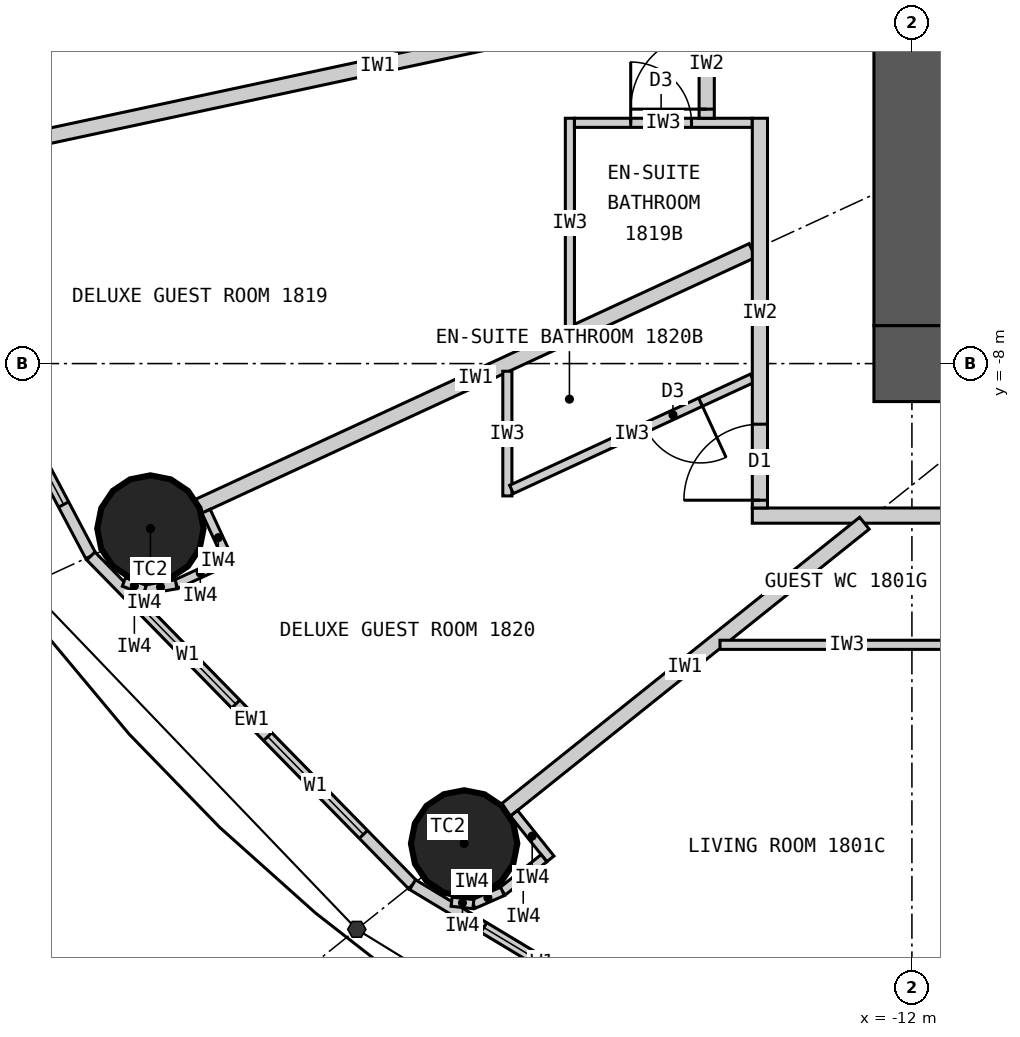
"""IFC4 building model, lengths in metres.
Left out: names, types, materials, properties, quantities, classifications, styles, units other than length and angle.
Written with IfcOpenShell. Run it as: python <this file> out.ifc"""

import sys

from ifc_helpers import new_model, si_unit, direction, frame, frame_2d, origin, origin_2d, place, context, subcontext, project, spatial, rectangle, circle, extrude, element, fill, save


model = new_model("IFC4")
c1 = context("Model", 3, precision=1e-05, world=origin(), true_north=direction((0.0, 1.0)))
c2 = subcontext(c1, "Body", "Model", "MODEL_VIEW")
j1 = project(units=[si_unit("LENGTHUNIT", "METRE"), si_unit("PLANEANGLEUNIT", "RADIAN")], contexts=[c1])
p1 = place(None, origin())
s1 = spatial("IfcSite", under=j1, at=p1, CompositionType="ELEMENT")
p2 = place(p1, origin())
s2 = spatial("IfcBuilding", under=s1, at=p2, CompositionType="ELEMENT")
p3 = place(p2, frame((0.0, 0.0, 73.8)))
s3 = spatial("IfcBuildingStorey", under=s2, at=p3, CompositionType="ELEMENT", Elevation=73.8)
for number, where, z_axis, x_axis in (
    (1, (-22.019, -10.17, 0.0), (0.0, 0.0, 1.0), (1.0, 0.0, 0.0)),
    (2, (-17.892, -14.313, 0.0), (0.0, 0.0, 1.0), (1.0, 0.0, 0.0)),
):
    element("IfcColumn", number, at=place(p3, frame(where, z_axis=z_axis, x_axis=x_axis)), inside=s3, PredefinedType="COLUMN", context=c2, shape_type="SweptSolid", body=[
        extrude(circle(Radius=0.7, at=origin_2d()), origin(), (0.0, 0.0, 1.0), 3.3),
    ])
p4 = place(p3, frame((12.5, -8.0, 0.0), z_axis=(0.0, 0.0, 1.0), x_axis=(-1.0, 0.0, 0.0)))
e3 = element("IfcWall", 3, at=p4, inside=s3, PredefinedType="SHEAR", context=c2, shape_type="SweptSolid", body=[
    extrude(rectangle(XDim=25.0, YDim=1.0, at=frame_2d((12.5, 0.0))), origin(), (0.0, 0.0, 1.0), 3.3),
])
p5 = place(p4, frame((11.2, 0.0, 0.0)))
e4 = element("IfcOpeningElement", 4, at=p5, cuts=e3, PredefinedType="OPENING", context=c2, shape_type="SweptSolid", body=[
    extrude(rectangle(XDim=1.2, YDim=2.2, at=frame_2d((0.6, 1.1))), frame((0.0, 0.51, 0.0), z_axis=(0.0, -1.0, 0.0), x_axis=(1.0, 0.0, 0.0)), (0.0, 0.0, 1.0), 1.02),
])
p6 = place(p4, frame((18.8, 0.0, 0.0)))
e5 = element("IfcOpeningElement", 5, at=p6, cuts=e3, PredefinedType="OPENING", context=c2, shape_type="SweptSolid", body=[
    extrude(rectangle(XDim=0.9, YDim=2.2, at=frame_2d((0.45, 1.1))), frame((0.0, 0.51, 0.0), z_axis=(0.0, -1.0, 0.0), x_axis=(1.0, 0.0, 0.0)), (0.0, 0.0, 1.0), 1.02),
])
p7 = place(p3, frame((-12.0, 7.5, 0.0), z_axis=(0.0, 0.0, 1.0), x_axis=(0.0, -1.0, 0.0)))
e6 = element("IfcWall", 6, at=p7, inside=s3, PredefinedType="SHEAR", context=c2, shape_type="SweptSolid", body=[
    extrude(rectangle(XDim=15.0, YDim=1.0, at=frame_2d((7.5, 0.0))), origin(), (0.0, 0.0, 1.0), 3.3),
])
p8 = place(p7, frame((6.6, 0.0, 0.0)))
e7 = element("IfcOpeningElement", 7, at=p8, cuts=e6, PredefinedType="OPENING", context=c2, shape_type="SweptSolid", body=[
    extrude(rectangle(XDim=1.8, YDim=2.2, at=frame_2d((0.9, 1.1))), frame((0.0, 0.51, 0.0), z_axis=(0.0, -1.0, 0.0), x_axis=(1.0, 0.0, 0.0)), (0.0, 0.0, 1.0), 1.02),
])
p9 = place(p3, frame((-25.482, -5.462, 0.0), z_axis=(0.0, 0.0, 1.0), x_axis=(0.467296867008, -0.884100468321, 0.0)))
e8 = element("IfcWall", 8, at=p9, inside=s3, PredefinedType="ELEMENTEDWALL", context=c2, shape_type="SweptSolid", body=[
    extrude(rectangle(XDim=5.734, YDim=0.15, at=frame_2d((2.867, 0.0))), origin(), (0.0, 0.0, 1.0), 3.12),
])
p10 = place(p9, frame((0.767, 0.0, 0.9)))
e9 = element("IfcOpeningElement", 9, at=p10, cuts=e8, PredefinedType="OPENING", context=c2, shape_type="SweptSolid", body=[
    extrude(rectangle(XDim=1.8, YDim=1.9, at=frame_2d((0.9, 0.95))), frame((0.0, 0.085, 0.0), z_axis=(0.0, -1.0, 0.0), x_axis=(1.0, 0.0, 0.0)), (0.0, 0.0, 1.0), 0.17),
])
p11 = place(p9, frame((3.167, 0.0, 0.9)))
e10 = element("IfcOpeningElement", 10, at=p11, cuts=e8, PredefinedType="OPENING", context=c2, shape_type="SweptSolid", body=[
    extrude(rectangle(XDim=1.8, YDim=1.9, at=frame_2d((0.9, 0.95))), frame((0.0, 0.085, 0.0), z_axis=(0.0, -1.0, 0.0), x_axis=(1.0, 0.0, 0.0)), (0.0, 0.0, 1.0), 0.17),
])
p12 = place(p3, frame((-22.803, -10.532, 0.0), z_axis=(0.0, 0.0, 1.0), x_axis=(0.699602905915, -0.714531856557, 0.0)))
e11 = element("IfcWall", 11, at=p12, inside=s3, PredefinedType="ELEMENTEDWALL", context=c2, shape_type="SweptSolid", body=[
    extrude(rectangle(XDim=6.051, YDim=0.15, at=frame_2d((3.025, 0.0))), origin(), (0.0, 0.0, 1.0), 3.12),
])
p13 = place(p12, frame((0.926, 0.0, 0.9)))
e12 = element("IfcOpeningElement", 12, at=p13, cuts=e11, PredefinedType="OPENING", context=c2, shape_type="SweptSolid", body=[
    extrude(rectangle(XDim=1.8, YDim=1.9, at=frame_2d((0.9, 0.95))), frame((0.0, 0.085, 0.0), z_axis=(0.0, -1.0, 0.0), x_axis=(1.0, 0.0, 0.0)), (0.0, 0.0, 1.0), 0.17),
])
p14 = place(p12, frame((3.325, 0.0, 0.9)))
e13 = element("IfcOpeningElement", 13, at=p14, cuts=e11, PredefinedType="OPENING", context=c2, shape_type="SweptSolid", body=[
    extrude(rectangle(XDim=1.8, YDim=1.9, at=frame_2d((0.9, 0.95))), frame((0.0, 0.085, 0.0), z_axis=(0.0, -1.0, 0.0), x_axis=(1.0, 0.0, 0.0)), (0.0, 0.0, 1.0), 0.17),
])
p15 = place(p3, frame((-18.57, -14.856, 0.0), z_axis=(0.0, 0.0, 1.0), x_axis=(0.856983180864, -0.515344377787, 0.0)))
e14 = element("IfcWall", 14, at=p15, inside=s3, PredefinedType="ELEMENTEDWALL", context=c2, shape_type="SweptSolid", body=[
    extrude(rectangle(XDim=6.386, YDim=0.15, at=frame_2d((3.193, 0.0))), origin(), (0.0, 0.0, 1.0), 3.12),
])
p16 = place(p15, frame((1.093, 0.0, 0.9)))
e15 = element("IfcOpeningElement", 15, at=p16, cuts=e14, PredefinedType="OPENING", context=c2, shape_type="SweptSolid", body=[
    extrude(rectangle(XDim=1.8, YDim=1.9, at=frame_2d((0.9, 0.95))), frame((0.0, 0.085, 0.0), z_axis=(0.0, -1.0, 0.0), x_axis=(1.0, 0.0, 0.0)), (0.0, 0.0, 1.0), 0.17),
])
p17 = place(p15, frame((3.493, 0.0, 0.9)))
e16 = element("IfcOpeningElement", 16, at=p17, cuts=e14, PredefinedType="OPENING", context=c2, shape_type="SweptSolid", body=[
    extrude(rectangle(XDim=1.8, YDim=1.9, at=frame_2d((0.9, 0.95))), frame((0.0, 0.085, 0.0), z_axis=(0.0, -1.0, 0.0), x_axis=(1.0, 0.0, 0.0)), (0.0, 0.0, 1.0), 0.17),
])
p18 = place(p3, frame((14.1, -10.0, 0.0), z_axis=(0.0, 0.0, 1.0), x_axis=(-1.0, 0.0, 0.0)))
e17 = element("IfcWall", 17, at=p18, inside=s3, PredefinedType="PARTITIONING", context=c2, shape_type="SweptSolid", body=[
    extrude(rectangle(XDim=28.2, YDim=0.2, at=frame_2d((14.1, 0.0))), origin(), (0.0, 0.0, 1.0), 3.12),
])
p19 = place(p18, frame((24.165, 0.0, 0.0)))
e18 = element("IfcOpeningElement", 18, at=p19, cuts=e17, PredefinedType="OPENING", context=c2, shape_type="SweptSolid", body=[
    extrude(rectangle(XDim=1.0, YDim=2.2, at=frame_2d((0.5, 1.1))), frame((0.0, 0.11, 0.0), z_axis=(0.0, -1.0, 0.0), x_axis=(1.0, 0.0, 0.0)), (0.0, 0.0, 1.0), 0.22),
])
p20 = place(p18, frame((14.923, 0.0, 0.0)))
e19 = element("IfcOpeningElement", 19, at=p20, cuts=e17, PredefinedType="OPENING", context=c2, shape_type="SweptSolid", body=[
    extrude(rectangle(XDim=1.0, YDim=2.2, at=frame_2d((0.5, 1.1))), frame((0.0, 0.11, 0.0), z_axis=(0.0, -1.0, 0.0), x_axis=(1.0, 0.0, 0.0)), (0.0, 0.0, 1.0), 0.22),
])
p21 = place(p18, frame((3.035, 0.0, 0.0)))
e20 = element("IfcOpeningElement", 20, at=p21, cuts=e17, PredefinedType="OPENING", context=c2, shape_type="SweptSolid", body=[
    extrude(rectangle(XDim=1.0, YDim=2.2, at=frame_2d((0.5, 1.1))), frame((0.0, 0.11, 0.0), z_axis=(0.0, -1.0, 0.0), x_axis=(1.0, 0.0, 0.0)), (0.0, 0.0, 1.0), 0.22),
])
p22 = place(p3, frame((-14.1, -3.022, 0.0), z_axis=(0.0, 0.0, 1.0), x_axis=(-0.977790014929, -0.209586943072, 0.0)))
e21 = element("IfcWall", 21, at=p22, inside=s3, PredefinedType="PARTITIONING", context=c2, shape_type="SweptSolid", body=[
    extrude(rectangle(XDim=10.087, YDim=0.2, at=frame_2d((5.043, 0.0))), origin(), (0.0, 0.0, 1.0), 2.32),
])
p23 = place(p3, frame((-14.1, -6.512, 0.0), z_axis=(0.0, 0.0, 1.0), x_axis=(-0.907832871056, -0.419332181247, 0.0)))
e22 = element("IfcWall", 22, at=p23, inside=s3, PredefinedType="PARTITIONING", context=c2, shape_type="SweptSolid", body=[
    extrude(rectangle(XDim=8.023, YDim=0.2, at=frame_2d((4.011, 0.0))), origin(), (0.0, 0.0, 1.0), 2.32),
])
p24 = place(p3, frame((-12.625, -10.1, 0.0), z_axis=(0.0, 0.0, 1.0), x_axis=(-0.780892451574, -0.624665493744, 0.0)))
e23 = element("IfcWall", 23, at=p24, inside=s3, PredefinedType="PARTITIONING", context=c2, shape_type="SweptSolid", body=[
    extrude(rectangle(XDim=6.045, YDim=0.2, at=frame_2d((3.022, 0.0))), origin(), (0.0, 0.0, 1.0), 2.32),
])
p25 = place(p3, frame((-7.289, -10.1, 0.0), z_axis=(0.0, 0.0, 1.0), x_axis=(-0.585198353053, -0.810890182197, 0.0)))
e24 = element("IfcWall", 24, at=p25, inside=s3, PredefinedType="PARTITIONING", context=c2, shape_type="SweptSolid", body=[
    extrude(rectangle(XDim=8.36, YDim=0.2, at=frame_2d((4.18, 0.0))), origin(), (0.0, 0.0, 1.0), 2.32),
])
p26 = place(p25, frame((0.72, 0.0, 0.0)))
e25 = element("IfcOpeningElement", 25, at=p26, cuts=e24, PredefinedType="OPENING", context=c2, shape_type="SweptSolid", body=[
    extrude(rectangle(XDim=0.9, YDim=2.1, at=frame_2d((0.45, 1.05))), frame((0.0, 0.11, 0.0), z_axis=(0.0, -1.0, 0.0), x_axis=(1.0, 0.0, 0.0)), (0.0, 0.0, 1.0), 0.22),
])
p27 = place(p3, frame((-14.525, -11.7, 0.0), z_axis=(0.0, 0.0, 1.0), x_axis=(1.0, 0.0, 0.0)))
e26 = element("IfcWall", 26, at=p27, inside=s3, PredefinedType="PARTITIONING", context=c2, shape_type="SweptSolid", body=[
    extrude(rectangle(XDim=3.34, YDim=0.12, at=frame_2d((1.67, 0.0))), origin(), (0.0, 0.0, 1.0), 3.12),
])
p28 = place(p3, frame((-16.5, -7.521, 0.0), z_axis=(0.0, 0.0, 1.0), x_axis=(0.0, 1.0, 0.0)))
e27 = element("IfcWall", 27, at=p28, inside=s3, PredefinedType="PARTITIONING", context=c2, shape_type="SweptSolid", body=[
    extrude(rectangle(XDim=2.749, YDim=0.12, at=frame_2d((1.374, 0.0))), origin(), (0.0, 0.0, 1.0), 3.12),
])
p29 = place(p3, frame((-14.1, -4.833, 0.0), z_axis=(0.0, 0.0, 1.0), x_axis=(-1.0, 0.0, 0.0)))
e28 = element("IfcWall", 28, at=p29, inside=s3, PredefinedType="PARTITIONING", context=c2, shape_type="SweptSolid", body=[
    extrude(rectangle(XDim=2.34, YDim=0.12, at=frame_2d((1.17, 0.0))), origin(), (0.0, 0.0, 1.0), 3.12),
])
p30 = place(p29, frame((0.8, 0.0, 0.0)))
e29 = element("IfcOpeningElement", 29, at=p30, cuts=e28, PredefinedType="OPENING", context=c2, shape_type="SweptSolid", body=[
    extrude(rectangle(XDim=0.8, YDim=2.1, at=frame_2d((0.4, 1.05))), frame((0.0, 0.07, 0.0), z_axis=(0.0, -1.0, 0.0), x_axis=(1.0, 0.0, 0.0)), (0.0, 0.0, 1.0), 0.14),
])
p31 = place(p3, frame((-17.323, -8.101, 0.0), z_axis=(0.0, 0.0, 1.0), x_axis=(0.0, -1.0, 0.0)))
e30 = element("IfcWall", 30, at=p31, inside=s3, PredefinedType="PARTITIONING", context=c2, shape_type="SweptSolid", body=[
    extrude(rectangle(XDim=1.64, YDim=0.12, at=frame_2d((0.82, 0.0))), origin(), (0.0, 0.0, 1.0), 3.12),
])
p32 = place(p3, frame((-14.1, -8.193, 0.0), z_axis=(0.0, 0.0, 1.0), x_axis=(-0.907836493557, -0.419324338628, 0.0)))
e31 = element("IfcWall", 31, at=p32, inside=s3, PredefinedType="PARTITIONING", context=c2, shape_type="SweptSolid", body=[
    extrude(rectangle(XDim=3.49, YDim=0.12, at=frame_2d((1.745, 0.0))), origin(), (0.0, 0.0, 1.0), 3.12),
])
p33 = place(p32, frame((0.75, 0.0, 0.0)))
e32 = element("IfcOpeningElement", 32, at=p33, cuts=e31, PredefinedType="OPENING", context=c2, shape_type="SweptSolid", body=[
    extrude(rectangle(XDim=0.8, YDim=2.1, at=frame_2d((0.4, 1.05))), frame((0.0, 0.07, 0.0), z_axis=(0.0, -1.0, 0.0), x_axis=(1.0, 0.0, 0.0)), (0.0, 0.0, 1.0), 0.14),
])
p34 = place(p3, frame((-14.7, -3.333, 0.0), z_axis=(0.0, 0.0, 1.0), x_axis=(0.0, -1.0, 0.0)))
e33 = element("IfcWall", 33, at=p34, inside=s3, PredefinedType="PARTITIONING", context=c2, shape_type="SweptSolid", body=[
    extrude(rectangle(XDim=1.44, YDim=0.2, at=frame_2d((0.72, 0.0))), origin(), (0.0, 0.0, 1.0), 3.12),
])
p35 = place(p34, frame((0.32, 0.0, 0.0)))
e34 = element("IfcOpeningElement", 34, at=p35, cuts=e33, PredefinedType="OPENING", context=c2, shape_type="SweptSolid", body=[
    extrude(rectangle(XDim=1.0, YDim=2.2, at=frame_2d((0.5, 1.1))), frame((0.0, 0.11, 0.0), z_axis=(0.0, -1.0, 0.0), x_axis=(1.0, 0.0, 0.0)), (0.0, 0.0, 1.0), 0.22),
])
p36 = place(p3, frame((-14.0, -4.772, 0.0), z_axis=(0.0, 0.0, 1.0), x_axis=(0.0, -1.0, 0.0)))
e35 = element("IfcWall", 35, at=p36, inside=s3, PredefinedType="PARTITIONING", context=c2, shape_type="SweptSolid", body=[
    extrude(rectangle(XDim=5.127, YDim=0.2, at=frame_2d((2.564, 0.0))), origin(), (0.0, 0.0, 1.0), 3.12),
])
p37 = place(p36, frame((4.025, 0.0, 0.0)))
e36 = element("IfcOpeningElement", 36, at=p37, cuts=e35, PredefinedType="OPENING", context=c2, shape_type="SweptSolid", body=[
    extrude(rectangle(XDim=1.0, YDim=2.2, at=frame_2d((0.5, 1.1))), frame((0.0, 0.11, 0.0), z_axis=(0.0, -1.0, 0.0), x_axis=(1.0, 0.0, 0.0)), (0.0, 0.0, 1.0), 0.22),
])
p38 = place(p3, frame((-21.287, -9.942, 0.0), z_axis=(0.0, 0.0, 1.0), x_axis=(0.419259891039, -0.907866258744, 0.0)))
e37 = element("IfcWall", 37, at=p38, inside=s3, PredefinedType="PARTITIONING", context=c2, shape_type="SweptSolid", body=[
    extrude(rectangle(XDim=0.768, YDim=0.12, at=frame_2d((0.384, 0.0))), origin(), (0.0, 0.0, 1.0), 3.12),
])
p39 = place(p3, frame((-21.045, -10.61, 0.0), z_axis=(0.0, 0.0, 1.0), x_axis=(-0.907877701396, -0.419235112208, 0.0)))
e38 = element("IfcWall", 38, at=p39, inside=s3, PredefinedType="PARTITIONING", context=c2, shape_type="SweptSolid", body=[
    extrude(rectangle(XDim=0.7, YDim=0.12, at=frame_2d((0.35, 0.0))), origin(), (0.0, 0.0, 1.0), 3.12),
])
p40 = place(p3, frame((-21.68, -10.903, 0.0), z_axis=(0.0, 0.0, 1.0), x_axis=(-0.985446622073, -0.169985161247, 0.0)))
e39 = element("IfcWall", 39, at=p40, inside=s3, PredefinedType="PARTITIONING", context=c2, shape_type="SweptSolid", body=[
    extrude(rectangle(XDim=0.418, YDim=0.12, at=frame_2d((0.209, 0.0))), origin(), (0.0, 0.0, 1.0), 3.12),
])
p41 = place(p3, frame((-22.092, -10.974, 0.0), z_axis=(0.0, 0.0, 1.0), x_axis=(-0.938428160676, 0.345474437912, 0.0)))
e40 = element("IfcWall", 40, at=p41, inside=s3, PredefinedType="PARTITIONING", context=c2, shape_type="SweptSolid", body=[
    extrude(rectangle(XDim=0.294, YDim=0.12, at=frame_2d((0.147, 0.0))), origin(), (0.0, 0.0, 1.0), 3.12),
])
p42 = place(p3, frame((-17.236, -13.917, 0.0), z_axis=(0.0, 0.0, 1.0), x_axis=(0.624695047554, -0.780868809443, 0.0)))
e41 = element("IfcWall", 41, at=p42, inside=s3, PredefinedType="PARTITIONING", context=c2, shape_type="SweptSolid", body=[
    extrude(rectangle(XDim=0.768, YDim=0.12, at=frame_2d((0.384, 0.0))), origin(), (0.0, 0.0, 1.0), 3.12),
])
p43 = place(p3, frame((-16.841, -14.507, 0.0), z_axis=(0.0, 0.0, 1.0), x_axis=(-0.780902834923, -0.62465251333, 0.0)))
e42 = element("IfcWall", 42, at=p43, inside=s3, PredefinedType="PARTITIONING", context=c2, shape_type="SweptSolid", body=[
    extrude(rectangle(XDim=0.7, YDim=0.12, at=frame_2d((0.35, 0.0))), origin(), (0.0, 0.0, 1.0), 3.12),
])
p44 = place(p3, frame((-17.387, -14.944, 0.0), z_axis=(0.0, 0.0, 1.0), x_axis=(-0.916036698064, -0.401094462441, 0.0)))
e43 = element("IfcWall", 43, at=p44, inside=s3, PredefinedType="PARTITIONING", context=c2, shape_type="SweptSolid", body=[
    extrude(rectangle(XDim=0.418, YDim=0.12, at=frame_2d((0.209, 0.0))), origin(), (0.0, 0.0, 1.0), 3.12),
])
p45 = place(p3, frame((-17.77, -15.112, 0.0), z_axis=(0.0, 0.0, 1.0), x_axis=(-0.993904401174, 0.110245368731, 0.0)))
e44 = element("IfcWall", 44, at=p45, inside=s3, PredefinedType="PARTITIONING", context=c2, shape_type="SweptSolid", body=[
    extrude(rectangle(XDim=0.288, YDim=0.12, at=frame_2d((0.144, 0.0))), origin(), (0.0, 0.0, 1.0), 3.12),
])
p46 = place(p11, origin())
e45 = element("IfcWindow", 45, at=p46, inside=s3, PartitioningType="SINGLE_PANEL", PredefinedType="WINDOW", context=c2, shape_type="SweptSolid", body=[
    extrude(rectangle(XDim=1.8, YDim=1.9, at=frame_2d((0.9, 0.95))), frame((0.0, 0.03, 0.0), z_axis=(0.0, -1.0, 0.0), x_axis=(1.0, 0.0, 0.0)), (0.0, 0.0, 1.0), 0.06),
])
fill(e10, e45)
p47 = place(p13, origin())
e46 = element("IfcWindow", 46, at=p47, inside=s3, PartitioningType="SINGLE_PANEL", PredefinedType="WINDOW", context=c2, shape_type="SweptSolid", body=[
    extrude(rectangle(XDim=1.8, YDim=1.9, at=frame_2d((0.9, 0.95))), frame((0.0, 0.03, 0.0), z_axis=(0.0, -1.0, 0.0), x_axis=(1.0, 0.0, 0.0)), (0.0, 0.0, 1.0), 0.06),
])
fill(e12, e46)
p48 = place(p14, origin())
e47 = element("IfcWindow", 47, at=p48, inside=s3, PartitioningType="SINGLE_PANEL", PredefinedType="WINDOW", context=c2, shape_type="SweptSolid", body=[
    extrude(rectangle(XDim=1.8, YDim=1.9, at=frame_2d((0.9, 0.95))), frame((0.0, 0.03, 0.0), z_axis=(0.0, -1.0, 0.0), x_axis=(1.0, 0.0, 0.0)), (0.0, 0.0, 1.0), 0.06),
])
fill(e13, e47)
p49 = place(p16, origin())
e48 = element("IfcWindow", 48, at=p49, inside=s3, PartitioningType="SINGLE_PANEL", PredefinedType="WINDOW", context=c2, shape_type="SweptSolid", body=[
    extrude(rectangle(XDim=1.8, YDim=1.9, at=frame_2d((0.9, 0.95))), frame((0.0, 0.03, 0.0), z_axis=(0.0, -1.0, 0.0), x_axis=(1.0, 0.0, 0.0)), (0.0, 0.0, 1.0), 0.06),
])
fill(e15, e48)
p50 = place(p30, origin())
e49 = element("IfcDoor", 49, at=p50, inside=s3, OperationType="SINGLE_SWING_RIGHT", PredefinedType="DOOR", context=c2, shape_type="SweptSolid", body=[
    extrude(rectangle(XDim=0.8, YDim=2.1, at=frame_2d((0.4, 1.05))), frame((0.0, 0.025, 0.0), z_axis=(0.0, -1.0, 0.0), x_axis=(1.0, 0.0, 0.0)), (0.0, 0.0, 1.0), 0.05),
])
fill(e29, e49)
p51 = place(p35, origin())
e50 = element("IfcDoor", 50, at=p51, inside=s3, OperationType="SINGLE_SWING_RIGHT", PredefinedType="DOOR", context=c2, shape_type="SweptSolid", body=[
    extrude(rectangle(XDim=1.0, YDim=2.2, at=frame_2d((0.5, 1.1))), frame((0.0, 0.025, 0.0), z_axis=(0.0, -1.0, 0.0), x_axis=(1.0, 0.0, 0.0)), (0.0, 0.0, 1.0), 0.05),
])
fill(e34, e50)
p52 = place(p33, origin())
e51 = element("IfcDoor", 51, at=p52, inside=s3, OperationType="SINGLE_SWING_LEFT", PredefinedType="DOOR", context=c2, shape_type="SweptSolid", body=[
    extrude(rectangle(XDim=0.8, YDim=2.1, at=frame_2d((0.4, 1.05))), frame((0.0, 0.025, 0.0), z_axis=(0.0, -1.0, 0.0), x_axis=(1.0, 0.0, 0.0)), (0.0, 0.0, 1.0), 0.05),
])
fill(e32, e51)
p53 = place(p37, origin())
e52 = element("IfcDoor", 52, at=p53, inside=s3, OperationType="SINGLE_SWING_RIGHT", PredefinedType="DOOR", context=c2, shape_type="SweptSolid", body=[
    extrude(rectangle(XDim=1.0, YDim=2.2, at=frame_2d((0.5, 1.1))), frame((0.0, 0.025, 0.0), z_axis=(0.0, -1.0, 0.0), x_axis=(1.0, 0.0, 0.0)), (0.0, 0.0, 1.0), 0.05),
])
fill(e36, e52)
save(model, sys.argv[1])
